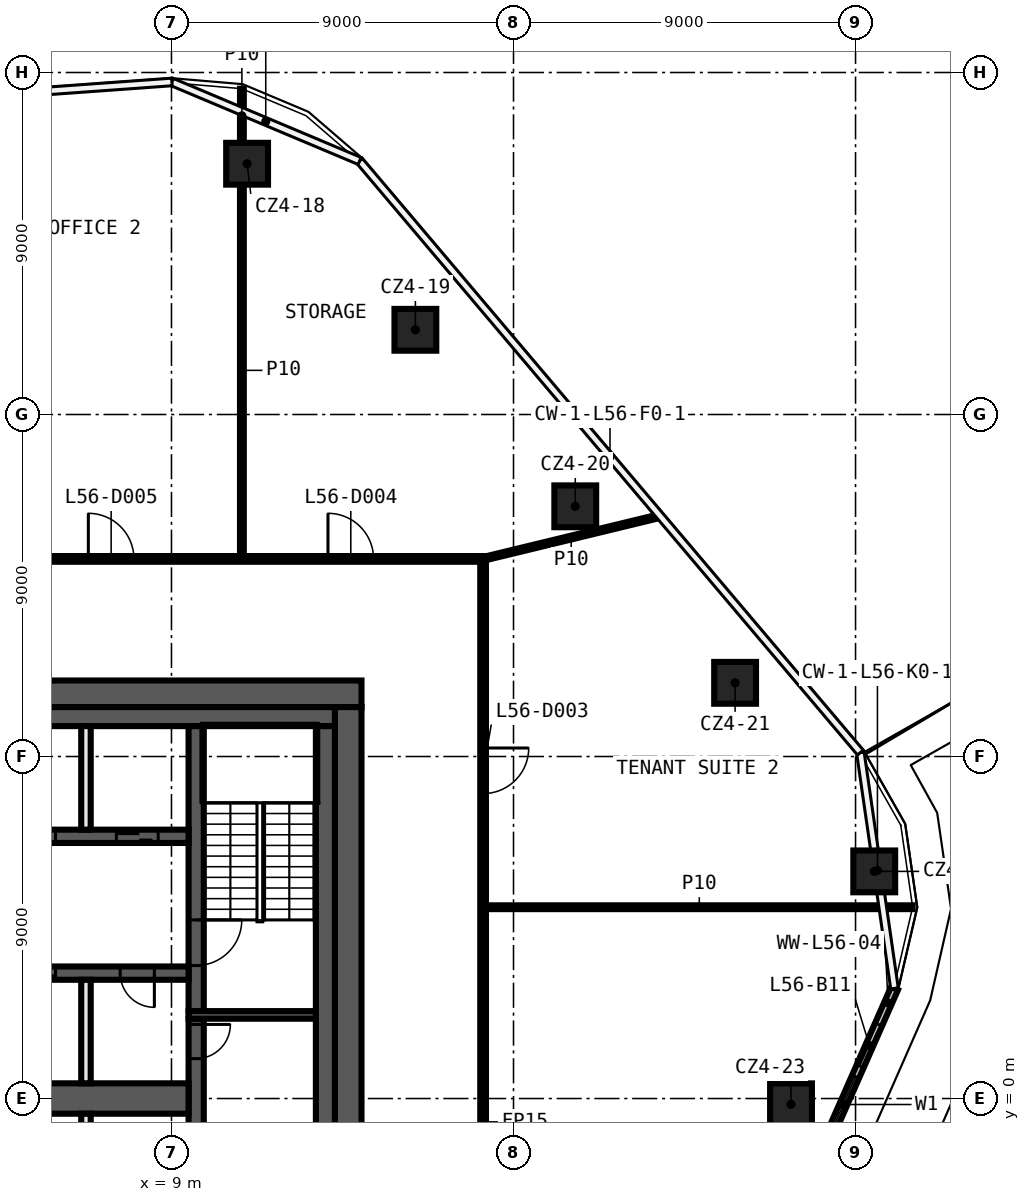
"""IFC4 building model, lengths in metres.
Left out: names, types, materials, properties, quantities, classifications, styles, units other than length and angle.
Written with IfcOpenShell. Run it as: python <this file> out.ifc"""

import sys

from ifc_helpers import new_model, si_unit, direction, frame, frame_2d, origin, origin_2d, place, context, subcontext, project, spatial, rectangle, extrude, element, fill, save


model = new_model("IFC4")
c1 = context("Model", 3, precision=1e-05, world=origin(), true_north=direction((0.0, 1.0)))
c2 = subcontext(c1, "Body", "Model", "MODEL_VIEW")
j1 = project(units=[si_unit("LENGTHUNIT", "METRE"), si_unit("PLANEANGLEUNIT", "RADIAN")], contexts=[c1])
p1 = place(None, origin())
s1 = spatial("IfcSite", under=j1, at=p1, CompositionType="ELEMENT")
p2 = place(p1, origin())
s2 = spatial("IfcBuilding", under=s1, at=p2, CompositionType="ELEMENT")
p3 = place(p2, frame((0.0, 0.0, 266.4)))
s3 = spatial("IfcBuildingStorey", under=s2, at=p3, CompositionType="ELEMENT", Elevation=266.4)
for number, where, z_axis, x_axis in (
    (1, (10.99, 24.599, 0.0), (0.0, 0.0, 1.0), (1.0, 0.0, 0.0)),
    (2, (15.418, 20.229, 0.0), (0.0, 0.0, 1.0), (1.0, 0.0, 0.0)),
    (3, (19.625, 15.584, 0.0), (0.0, 0.0, 1.0), (1.0, 0.0, 0.0)),
    (4, (23.831, 10.939, 0.0), (0.0, 0.0, 1.0), (1.0, 0.0, 0.0)),
    (5, (27.492, 5.977, 0.0), (0.0, 0.0, 1.0), (1.0, 0.0, 0.0)),
    (6, (25.302, -0.152, 0.0), (0.0, 0.0, 1.0), (1.0, 0.0, 0.0)),
):
    element("IfcColumn", number, at=place(p3, frame(where, z_axis=z_axis, x_axis=x_axis)), inside=s3, PredefinedType="COLUMN", context=c2, shape_type="SweptSolid", body=[
        extrude(rectangle(XDim=1.1, YDim=1.1, at=origin_2d()), origin(), (0.0, 0.0, 1.0), 3.82),
    ])
p4 = place(p3, frame((17.275, 5.034, 0.0), z_axis=(0.0, 0.0, 1.0), x_axis=(1.0, 0.0, 0.0)))
e7 = element("IfcWall", 7, at=p4, inside=s3, PredefinedType="PARTITIONING", context=c2, shape_type="SweptSolid", body=[
    extrude(rectangle(XDim=11.227, YDim=0.1, at=frame_2d((5.614, 0.0))), origin(), (0.0, 0.0, 1.0), 3.82),
])
p5 = place(p3, frame((-5.075, 14.2, 0.0), z_axis=(0.0, 0.0, 1.0), x_axis=(1.0, 0.0, 0.0)))
e8 = element("IfcWall", 8, at=p5, inside=s3, PredefinedType="PARTITIONING", context=c2, shape_type="SweptSolid", body=[
    extrude(rectangle(XDim=22.35, YDim=0.15, at=frame_2d((11.175, 0.0))), origin(), (0.0, 0.0, 1.0), 3.82),
])
p6 = place(p5, frame((18.193, 0.0, 0.0)))
e9 = element("IfcOpeningElement", 9, at=p6, cuts=e8, PredefinedType="OPENING", context=c2, shape_type="SweptSolid", body=[
    extrude(rectangle(XDim=1.2, YDim=2.1, at=frame_2d((0.6, 1.05))), frame((0.0, 0.085, 0.0), z_axis=(0.0, -1.0, 0.0), x_axis=(1.0, 0.0, 0.0)), (0.0, 0.0, 1.0), 0.17),
])
p7 = place(p5, frame((11.887, 0.0, 0.0)))
e10 = element("IfcOpeningElement", 10, at=p7, cuts=e8, PredefinedType="OPENING", context=c2, shape_type="SweptSolid", body=[
    extrude(rectangle(XDim=1.2, YDim=2.1, at=frame_2d((0.6, 1.05))), frame((0.0, 0.085, 0.0), z_axis=(0.0, -1.0, 0.0), x_axis=(1.0, 0.0, 0.0)), (0.0, 0.0, 1.0), 0.17),
])
p8 = place(p3, frame((17.2, 14.2, 0.0), z_axis=(0.0, 0.0, 1.0), x_axis=(0.971845844502, 0.235617602322, 0.0)))
e11 = element("IfcWall", 11, at=p8, inside=s3, PredefinedType="PARTITIONING", context=c2, shape_type="SweptSolid", body=[
    extrude(rectangle(XDim=4.771, YDim=0.1, at=frame_2d((2.385, 0.0))), origin(), (0.0, 0.0, 1.0), 3.82),
])
p9 = place(p3, frame((17.2, 14.125, 0.0), z_axis=(0.0, 0.0, 1.0), x_axis=(0.0, -1.0, 0.0)))
e12 = element("IfcWall", 12, at=p9, inside=s3, PredefinedType="PARTITIONING", context=c2, shape_type="SweptSolid", body=[
    extrude(rectangle(XDim=28.25, YDim=0.15, at=frame_2d((14.125, 0.0))), origin(), (0.0, 0.0, 1.0), 3.82),
])
p10 = place(p9, frame((23.379, 0.0, 0.0)))
e13 = element("IfcOpeningElement", 13, at=p10, cuts=e12, PredefinedType="OPENING", context=c2, shape_type="SweptSolid", body=[
    extrude(rectangle(XDim=1.2, YDim=2.1, at=frame_2d((0.6, 1.05))), frame((0.0, 0.085, 0.0), z_axis=(0.0, -1.0, 0.0), x_axis=(1.0, 0.0, 0.0)), (0.0, 0.0, 1.0), 0.17),
])
p11 = place(p9, frame((4.901, 0.0, 0.0)))
e14 = element("IfcOpeningElement", 14, at=p11, cuts=e12, PredefinedType="OPENING", context=c2, shape_type="SweptSolid", body=[
    extrude(rectangle(XDim=1.2, YDim=2.1, at=frame_2d((0.6, 1.05))), frame((0.0, 0.085, 0.0), z_axis=(0.0, -1.0, 0.0), x_axis=(1.0, 0.0, 0.0)), (0.0, 0.0, 1.0), 0.17),
])
p12 = place(p3, frame((10.853, 14.275, 0.0), z_axis=(0.0, 0.0, 1.0), x_axis=(0.0, 1.0, 0.0)))
e15 = element("IfcWall", 15, at=p12, inside=s3, PredefinedType="PARTITIONING", context=c2, shape_type="SweptSolid", body=[
    extrude(rectangle(XDim=9.774, YDim=0.1, at=frame_2d((4.887, 0.0))), origin(), (0.0, 0.0, 1.0), 3.82),
])
p13 = place(p3, frame((10.853, 25.149, 0.0), z_axis=(0.0, 0.0, 1.0), x_axis=(0.0, 1.0, 0.0)))
e16 = element("IfcWall", 16, at=p13, inside=s3, PredefinedType="PARTITIONING", context=c2, shape_type="SweptSolid", body=[
    extrude(rectangle(XDim=1.423, YDim=0.1, at=frame_2d((0.712, 0.0))), origin(), (0.0, 0.0, 1.0), 3.82),
])
p14 = place(p3, frame((26.154, -1.347, 0.0), z_axis=(0.0, 0.0, 1.0), x_axis=(0.403299401998, 0.915068080718, 0.0)))
e17 = element("IfcWall", 17, at=p14, inside=s3, PredefinedType="SOLIDWALL", context=c2, shape_type="SweptSolid", body=[
    extrude(rectangle(XDim=4.639, YDim=0.2, at=frame_2d((2.319, 0.0))), origin(), (0.0, 0.0, 1.0), 3.82),
])
p15 = place(p14, frame((0.5, 0.0, 0.6)))
e18 = element("IfcOpeningElement", 18, at=p15, cuts=e17, PredefinedType="OPENING", context=c2, shape_type="SweptSolid", body=[
    extrude(rectangle(XDim=1.6, YDim=2.4, at=frame_2d((0.8, 1.2))), frame((0.0, 0.11, 0.0), z_axis=(0.0, -1.0, 0.0), x_axis=(1.0, 0.0, 0.0)), (0.0, 0.0, 1.0), 0.22),
])
p16 = place(p14, frame((2.4, 0.0, 0.0)))
e19 = element("IfcOpeningElement", 19, at=p16, cuts=e17, PredefinedType="OPENING", context=c2, shape_type="SweptSolid", body=[
    extrude(rectangle(XDim=1.2, YDim=2.4, at=frame_2d((0.6, 1.2))), frame((0.0, 0.11, 0.0), z_axis=(0.0, -1.0, 0.0), x_axis=(1.0, 0.0, 0.0)), (0.0, 0.0, 1.0), 0.22),
])
p17 = place(p3, frame((-14.0, 10.65, 0.0), z_axis=(0.0, 0.0, 1.0), x_axis=(1.0, 0.0, 0.0)))
e20 = element("IfcWall", 20, at=p17, inside=s3, PredefinedType="SHEAR", context=c2, shape_type="SweptSolid", body=[
    extrude(rectangle(XDim=28.0, YDim=0.7, at=frame_2d((14.0, 0.0))), origin(), (0.0, 0.0, 1.0), 3.82),
])
p18 = place(p17, frame((15.9, 0.0, 0.0)))
e21 = element("IfcOpeningElement", 21, at=p18, cuts=e20, PredefinedType="OPENING", context=c2, shape_type="SweptSolid", body=[
    extrude(rectangle(XDim=1.6, YDim=2.1, at=frame_2d((0.8, 1.05))), frame((0.0, 0.36, 0.0), z_axis=(0.0, -1.0, 0.0), x_axis=(1.0, 0.0, 0.0)), (0.0, 0.0, 1.0), 0.72),
])
p19 = place(p3, frame((13.65, 10.3, 0.0), z_axis=(0.0, 0.0, 1.0), x_axis=(0.0, -1.0, 0.0)))
e22 = element("IfcWall", 22, at=p19, inside=s3, PredefinedType="SHEAR", context=c2, shape_type="SweptSolid", body=[
    extrude(rectangle(XDim=20.6, YDim=0.7, at=frame_2d((10.3, 0.0))), origin(), (0.0, 0.0, 1.0), 3.82),
])
p20 = place(p3, frame((3.9, 10.05, 0.0), z_axis=(0.0, 0.0, 1.0), x_axis=(1.0, 0.0, 0.0)))
e23 = element("IfcWall", 23, at=p20, inside=s3, PredefinedType="SHEAR", context=c2, shape_type="SweptSolid", body=[
    extrude(rectangle(XDim=9.4, YDim=0.5, at=frame_2d((4.7, 0.0))), origin(), (0.0, 0.0, 1.0), 3.82),
])
p21 = place(p3, frame((13.05, 9.8, 0.0), z_axis=(0.0, 0.0, 1.0), x_axis=(0.0, -1.0, 0.0)))
e24 = element("IfcWall", 24, at=p21, inside=s3, PredefinedType="SHEAR", context=c2, shape_type="SweptSolid", body=[
    extrude(rectangle(XDim=19.6, YDim=0.5, at=frame_2d((9.8, 0.0))), origin(), (0.0, 0.0, 1.0), 3.82),
])
p22 = place(p3, frame((9.65, 2.1, 0.0), z_axis=(0.0, 0.0, 1.0), x_axis=(0.0, -1.0, 0.0)))
e25 = element("IfcWall", 25, at=p22, inside=s3, PredefinedType="SHEAR", context=c2, shape_type="SweptSolid", body=[
    extrude(rectangle(XDim=4.2, YDim=0.4, at=frame_2d((2.1, 0.0))), origin(), (0.0, 0.0, 1.0), 3.82),
])
p23 = place(p22, frame((0.15, 0.0, 0.0)))
e26 = element("IfcOpeningElement", 26, at=p23, cuts=e25, PredefinedType="OPENING", context=c2, shape_type="SweptSolid", body=[
    extrude(rectangle(XDim=0.9, YDim=2.1, at=frame_2d((0.45, 1.05))), frame((0.0, 0.21, 0.0), z_axis=(0.0, -1.0, 0.0), x_axis=(1.0, 0.0, 0.0)), (0.0, 0.0, 1.0), 0.42),
])
p24 = place(p3, frame((9.65, 9.8, 0.0), z_axis=(0.0, 0.0, 1.0), x_axis=(0.0, -1.0, 0.0)))
e27 = element("IfcWall", 27, at=p24, inside=s3, PredefinedType="SHEAR", context=c2, shape_type="SweptSolid", body=[
    extrude(rectangle(XDim=7.5, YDim=0.4, at=frame_2d((3.75, 0.0))), origin(), (0.0, 0.0, 1.0), 3.82),
])
p25 = place(p24, frame((5.1, 0.0, 0.0)))
e28 = element("IfcOpeningElement", 28, at=p25, cuts=e27, PredefinedType="OPENING", context=c2, shape_type="SweptSolid", body=[
    extrude(rectangle(XDim=1.2, YDim=2.1, at=frame_2d((0.6, 1.05))), frame((0.0, 0.21, 0.0), z_axis=(0.0, -1.0, 0.0), x_axis=(1.0, 0.0, 0.0)), (0.0, 0.0, 1.0), 0.42),
])
p26 = place(p3, frame((9.45, 2.2, 0.0), z_axis=(0.0, 0.0, 1.0), x_axis=(1.0, 0.0, 0.0)))
e29 = element("IfcWall", 29, at=p26, inside=s3, PredefinedType="SHEAR", context=c2, shape_type="SweptSolid", body=[
    extrude(rectangle(XDim=3.35, YDim=0.2, at=frame_2d((1.675, 0.0))), origin(), (0.0, 0.0, 1.0), 3.82),
])
p27 = place(p3, frame((-9.45, 6.9, 0.0), z_axis=(0.0, 0.0, 1.0), x_axis=(1.0, 0.0, 0.0)))
e30 = element("IfcWall", 30, at=p27, inside=s3, PredefinedType="SHEAR", context=c2, shape_type="SweptSolid", body=[
    extrude(rectangle(XDim=18.9, YDim=0.35, at=frame_2d((9.45, 0.0))), origin(), (0.0, 0.0, 1.0), 3.82),
])
p28 = place(p27, frame((11.55, 0.0, 0.0)))
e31 = element("IfcOpeningElement", 31, at=p28, cuts=e30, PredefinedType="OPENING", context=c2, shape_type="SweptSolid", body=[
    extrude(rectangle(XDim=1.2, YDim=2.1, at=frame_2d((0.6, 1.05))), frame((0.0, 0.185, 0.0), z_axis=(0.0, -1.0, 0.0), x_axis=(1.0, 0.0, 0.0)), (0.0, 0.0, 1.0), 0.37),
])
p29 = place(p27, frame((14.3, 0.0, 0.0)))
e32 = element("IfcOpeningElement", 32, at=p29, cuts=e30, PredefinedType="OPENING", context=c2, shape_type="SweptSolid", body=[
    extrude(rectangle(XDim=1.1, YDim=2.1, at=frame_2d((0.55, 1.05))), frame((0.0, 0.185, 0.0), z_axis=(0.0, -1.0, 0.0), x_axis=(1.0, 0.0, 0.0)), (0.0, 0.0, 1.0), 0.37),
])
p30 = place(p27, frame((17.0, 0.0, 0.0)))
e33 = element("IfcOpeningElement", 33, at=p30, cuts=e30, PredefinedType="OPENING", context=c2, shape_type="SweptSolid", body=[
    extrude(rectangle(XDim=1.1, YDim=2.1, at=frame_2d((0.55, 1.05))), frame((0.0, 0.185, 0.0), z_axis=(0.0, -1.0, 0.0), x_axis=(1.0, 0.0, 0.0)), (0.0, 0.0, 1.0), 0.37),
])
p31 = place(p27, frame((2.25, 0.0, 0.0)))
e34 = element("IfcOpeningElement", 34, at=p31, cuts=e30, PredefinedType="OPENING", context=c2, shape_type="SweptSolid", body=[
    extrude(rectangle(XDim=0.9, YDim=2.1, at=frame_2d((0.45, 1.05))), frame((0.0, 0.185, 0.0), z_axis=(0.0, -1.0, 0.0), x_axis=(1.0, 0.0, 0.0)), (0.0, 0.0, 1.0), 0.37),
])
p32 = place(p27, frame((7.65, 0.0, 0.0)))
e35 = element("IfcOpeningElement", 35, at=p32, cuts=e30, PredefinedType="OPENING", context=c2, shape_type="SweptSolid", body=[
    extrude(rectangle(XDim=0.9, YDim=2.1, at=frame_2d((0.45, 1.05))), frame((0.0, 0.185, 0.0), z_axis=(0.0, -1.0, 0.0), x_axis=(1.0, 0.0, 0.0)), (0.0, 0.0, 1.0), 0.37),
])
p33 = place(p3, frame((9.45, 3.3, 0.0), z_axis=(0.0, 0.0, 1.0), x_axis=(-1.0, 0.0, 0.0)))
e36 = element("IfcWall", 36, at=p33, inside=s3, PredefinedType="SHEAR", context=c2, shape_type="SweptSolid", body=[
    extrude(rectangle(XDim=18.9, YDim=0.35, at=frame_2d((9.45, 0.0))), origin(), (0.0, 0.0, 1.0), 3.82),
])
p34 = place(p33, frame((6.2, 0.0, 0.0)))
e37 = element("IfcOpeningElement", 37, at=p34, cuts=e36, PredefinedType="OPENING", context=c2, shape_type="SweptSolid", body=[
    extrude(rectangle(XDim=1.1, YDim=2.1, at=frame_2d((0.55, 1.05))), frame((0.0, 0.185, 0.0), z_axis=(0.0, -1.0, 0.0), x_axis=(1.0, 0.0, 0.0)), (0.0, 0.0, 1.0), 0.37),
])
p35 = place(p33, frame((3.5, 0.0, 0.0)))
e38 = element("IfcOpeningElement", 38, at=p35, cuts=e36, PredefinedType="OPENING", context=c2, shape_type="SweptSolid", body=[
    extrude(rectangle(XDim=1.1, YDim=2.1, at=frame_2d((0.55, 1.05))), frame((0.0, 0.185, 0.0), z_axis=(0.0, -1.0, 0.0), x_axis=(1.0, 0.0, 0.0)), (0.0, 0.0, 1.0), 0.37),
])
p36 = place(p33, frame((0.9, 0.0, 0.0)))
e39 = element("IfcOpeningElement", 39, at=p36, cuts=e36, PredefinedType="OPENING", context=c2, shape_type="SweptSolid", body=[
    extrude(rectangle(XDim=0.9, YDim=2.1, at=frame_2d((0.45, 1.05))), frame((0.0, 0.185, 0.0), z_axis=(0.0, -1.0, 0.0), x_axis=(1.0, 0.0, 0.0)), (0.0, 0.0, 1.0), 0.37),
])
p37 = place(p33, frame((17.1, 0.0, 0.0)))
e40 = element("IfcOpeningElement", 40, at=p37, cuts=e36, PredefinedType="OPENING", context=c2, shape_type="SweptSolid", body=[
    extrude(rectangle(XDim=0.9, YDim=2.1, at=frame_2d((0.45, 1.05))), frame((0.0, 0.185, 0.0), z_axis=(0.0, -1.0, 0.0), x_axis=(1.0, 0.0, 0.0)), (0.0, 0.0, 1.0), 0.37),
])
p38 = place(p33, frame((14.4, 0.0, 0.0)))
e41 = element("IfcOpeningElement", 41, at=p38, cuts=e36, PredefinedType="OPENING", context=c2, shape_type="SweptSolid", body=[
    extrude(rectangle(XDim=0.9, YDim=2.1, at=frame_2d((0.45, 1.05))), frame((0.0, 0.185, 0.0), z_axis=(0.0, -1.0, 0.0), x_axis=(1.0, 0.0, 0.0)), (0.0, 0.0, 1.0), 0.37),
])
p39 = place(p33, frame((11.7, 0.0, 0.0)))
e42 = element("IfcOpeningElement", 42, at=p39, cuts=e36, PredefinedType="OPENING", context=c2, shape_type="SweptSolid", body=[
    extrude(rectangle(XDim=0.9, YDim=2.1, at=frame_2d((0.45, 1.05))), frame((0.0, 0.185, 0.0), z_axis=(0.0, -1.0, 0.0), x_axis=(1.0, 0.0, 0.0)), (0.0, 0.0, 1.0), 0.37),
])
p40 = place(p33, frame((9.0, 0.0, 0.0)))
e43 = element("IfcOpeningElement", 43, at=p40, cuts=e36, PredefinedType="OPENING", context=c2, shape_type="SweptSolid", body=[
    extrude(rectangle(XDim=0.9, YDim=2.1, at=frame_2d((0.45, 1.05))), frame((0.0, 0.185, 0.0), z_axis=(0.0, -1.0, 0.0), x_axis=(1.0, 0.0, 0.0)), (0.0, 0.0, 1.0), 0.37),
])
p41 = place(p3, frame((-9.45, 0.0, 0.0), z_axis=(0.0, 0.0, 1.0), x_axis=(1.0, 0.0, 0.0)))
e44 = element("IfcWall", 44, at=p41, inside=s3, PredefinedType="SHEAR", context=c2, shape_type="SweptSolid", body=[
    extrude(rectangle(XDim=18.9, YDim=0.8, at=frame_2d((9.45, 0.0))), origin(), (0.0, 0.0, 1.0), 3.82),
])
for number, where, z_axis, x_axis in (
    (45, (6.75, -3.125, 0.0), (0.0, 0.0, 1.0), (0.0, 1.0, 0.0)),
    (46, (6.75, 0.4, 0.0), (0.0, 0.0, 1.0), (0.0, 1.0, 0.0)),
    (47, (6.75, 7.075, 0.0), (0.0, 0.0, 1.0), (0.0, 1.0, 0.0)),
):
    element("IfcWall", number, at=place(p3, frame(where, z_axis=z_axis, x_axis=x_axis)), inside=s3, PredefinedType="SOLIDWALL", context=c2, shape_type="SweptSolid", body=[
        extrude(rectangle(XDim=2.725, YDim=0.25, at=frame_2d((1.363, 0.0))), origin(), (0.0, 0.0, 1.0), 3.82),
    ])
p42 = place(p11, origin())
e48 = element("IfcDoor", 48, at=p42, inside=s3, OperationType="SINGLE_SWING_RIGHT", PredefinedType="DOOR", context=c2, shape_type="SweptSolid", body=[
    extrude(rectangle(XDim=1.2, YDim=2.1, at=frame_2d((0.6, 1.05))), frame((0.0, 0.025, 0.0), z_axis=(0.0, -1.0, 0.0), x_axis=(1.0, 0.0, 0.0)), (0.0, 0.0, 1.0), 0.05),
])
fill(e14, e48)
p43 = place(p6, origin())
e49 = element("IfcDoor", 49, at=p43, inside=s3, OperationType="SINGLE_SWING_LEFT", PredefinedType="DOOR", context=c2, shape_type="SweptSolid", body=[
    extrude(rectangle(XDim=1.2, YDim=2.1, at=frame_2d((0.6, 1.05))), frame((0.0, 0.025, 0.0), z_axis=(0.0, -1.0, 0.0), x_axis=(1.0, 0.0, 0.0)), (0.0, 0.0, 1.0), 0.05),
])
fill(e9, e49)
p44 = place(p7, origin())
e50 = element("IfcDoor", 50, at=p44, inside=s3, OperationType="SINGLE_SWING_RIGHT", PredefinedType="DOOR", context=c2, shape_type="SweptSolid", body=[
    extrude(rectangle(XDim=1.2, YDim=2.1, at=frame_2d((0.6, 1.05))), frame((0.0, 0.025, 0.0), z_axis=(0.0, -1.0, 0.0), x_axis=(1.0, 0.0, 0.0)), (0.0, 0.0, 1.0), 0.05),
])
fill(e10, e50)
p45 = place(p15, origin())
e51 = element("IfcWindow", 51, at=p45, inside=s3, PartitioningType="SINGLE_PANEL", PredefinedType="WINDOW", context=c2, shape_type="SweptSolid", body=[
    extrude(rectangle(XDim=1.6, YDim=2.4, at=frame_2d((0.8, 1.2))), frame((0.0, 0.03, 0.0), z_axis=(0.0, -1.0, 0.0), x_axis=(1.0, 0.0, 0.0)), (0.0, 0.0, 1.0), 0.06),
])
fill(e18, e51)
p46 = place(p16, origin())
e52 = element("IfcDoor", 52, at=p46, inside=s3, OperationType="SLIDING_TO_LEFT", PredefinedType="DOOR", context=c2, shape_type="SweptSolid", body=[
    extrude(rectangle(XDim=1.2, YDim=2.4, at=frame_2d((0.6, 1.2))), frame((0.0, 0.025, 0.0), z_axis=(0.0, -1.0, 0.0), x_axis=(1.0, 0.0, 0.0)), (0.0, 0.0, 1.0), 0.05),
])
fill(e19, e52)
p47 = place(p23, origin())
e53 = element("IfcDoor", 53, at=p47, inside=s3, OperationType="SINGLE_SWING_RIGHT", PredefinedType="DOOR", context=c2, shape_type="SweptSolid", body=[
    extrude(rectangle(XDim=0.9, YDim=2.1, at=frame_2d((0.45, 1.05))), frame((0.0, 0.025, 0.0), z_axis=(0.0, -1.0, 0.0), x_axis=(1.0, 0.0, 0.0)), (0.0, 0.0, 1.0), 0.05),
])
fill(e26, e53)
p48 = place(p29, origin())
e54 = element("IfcDoor", 54, at=p48, inside=s3, OperationType="DOUBLE_DOOR_SLIDING", PredefinedType="DOOR", context=c2, shape_type="SweptSolid", body=[
    extrude(rectangle(XDim=1.1, YDim=2.1, at=frame_2d((0.55, 1.05))), frame((0.0, 0.025, 0.0), z_axis=(0.0, -1.0, 0.0), x_axis=(1.0, 0.0, 0.0)), (0.0, 0.0, 1.0), 0.05),
])
fill(e32, e54)
p49 = place(p30, origin())
e55 = element("IfcDoor", 55, at=p49, inside=s3, OperationType="DOUBLE_DOOR_SLIDING", PredefinedType="DOOR", context=c2, shape_type="SweptSolid", body=[
    extrude(rectangle(XDim=1.1, YDim=2.1, at=frame_2d((0.55, 1.05))), frame((0.0, 0.025, 0.0), z_axis=(0.0, -1.0, 0.0), x_axis=(1.0, 0.0, 0.0)), (0.0, 0.0, 1.0), 0.05),
])
fill(e33, e55)
p50 = place(p35, origin())
e56 = element("IfcDoor", 56, at=p50, inside=s3, OperationType="DOUBLE_DOOR_SLIDING", PredefinedType="DOOR", context=c2, shape_type="SweptSolid", body=[
    extrude(rectangle(XDim=1.1, YDim=2.1, at=frame_2d((0.55, 1.05))), frame((0.0, 0.025, 0.0), z_axis=(0.0, -1.0, 0.0), x_axis=(1.0, 0.0, 0.0)), (0.0, 0.0, 1.0), 0.05),
])
fill(e38, e56)
p51 = place(p36, origin())
e57 = element("IfcDoor", 57, at=p51, inside=s3, OperationType="SINGLE_SWING_LEFT", PredefinedType="DOOR", context=c2, shape_type="SweptSolid", body=[
    extrude(rectangle(XDim=0.9, YDim=2.1, at=frame_2d((0.45, 1.05))), frame((0.0, 0.025, 0.0), z_axis=(0.0, -1.0, 0.0), x_axis=(1.0, 0.0, 0.0)), (0.0, 0.0, 1.0), 0.05),
])
fill(e39, e57)
p52 = place(p25, origin())
e58 = element("IfcDoor", 58, at=p52, inside=s3, OperationType="SINGLE_SWING_LEFT", PredefinedType="DOOR", context=c2, shape_type="SweptSolid", body=[
    extrude(rectangle(XDim=1.2, YDim=2.1, at=frame_2d((0.6, 1.05))), frame((0.0, 0.025, 0.0), z_axis=(0.0, -1.0, 0.0), x_axis=(1.0, 0.0, 0.0)), (0.0, 0.0, 1.0), 0.05),
])
fill(e28, e58)
save(model, sys.argv[1])
